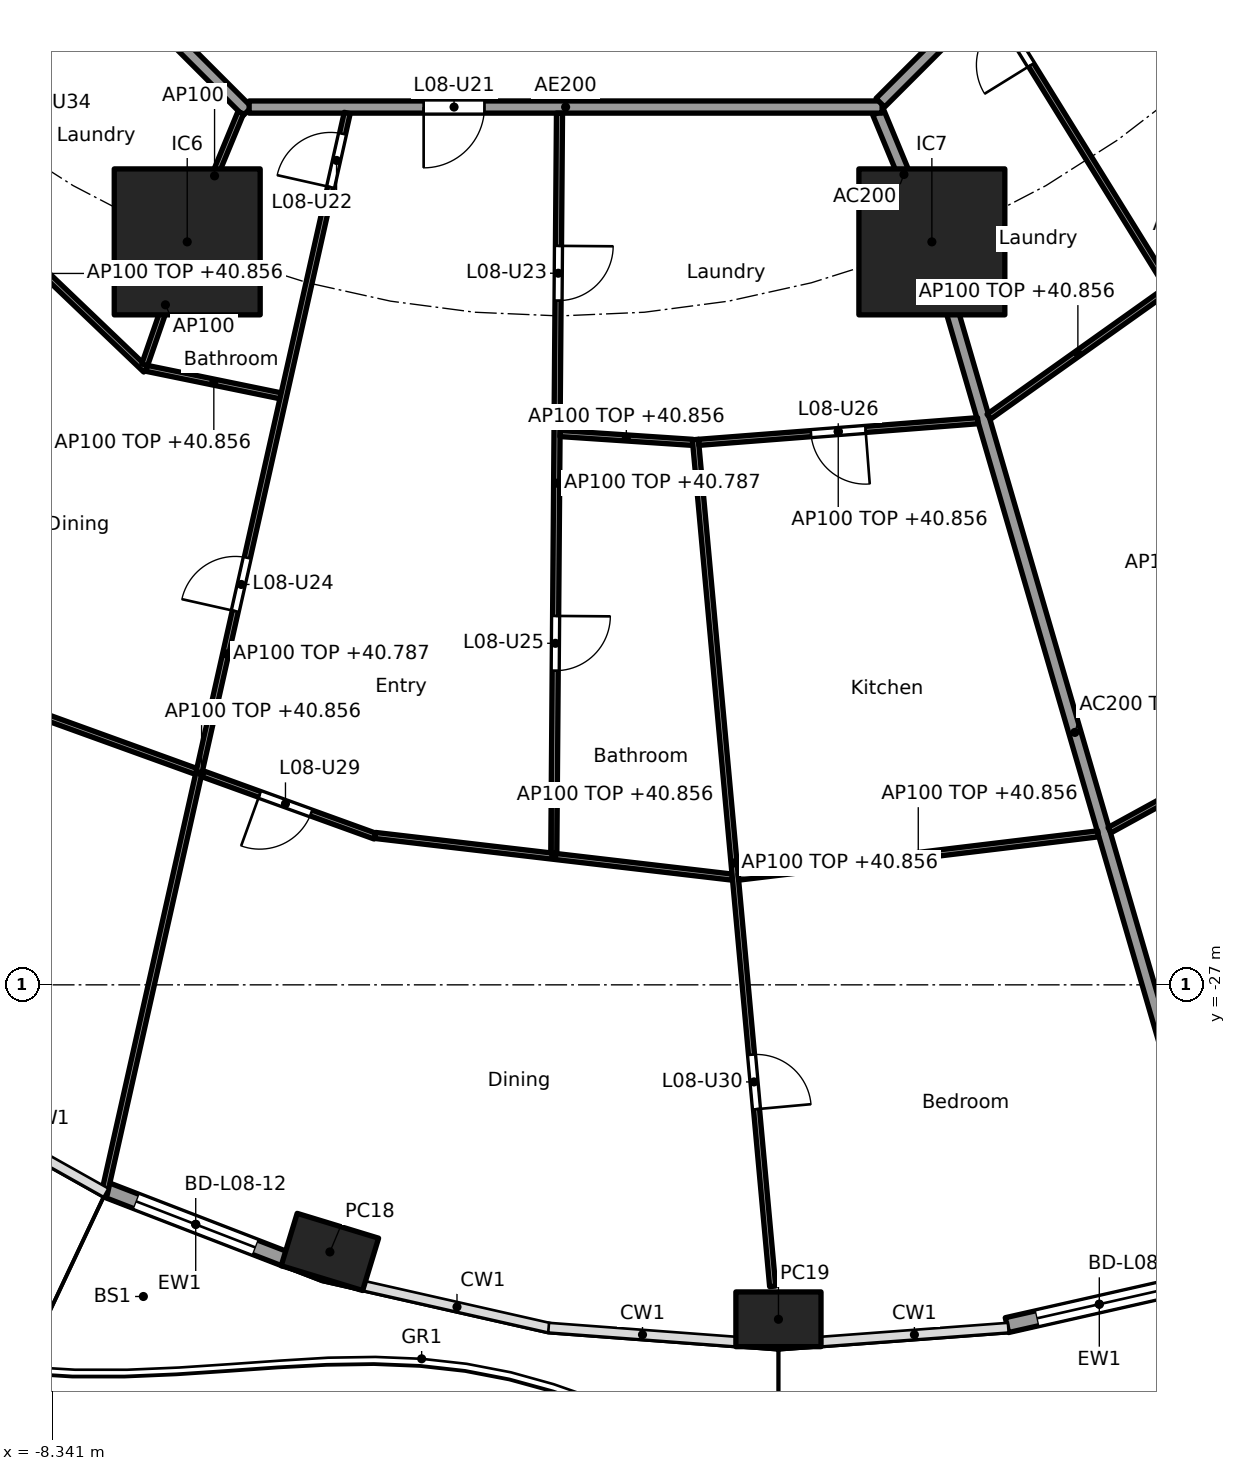
"""IFC4 building model, lengths in metres.
Left out: names, types, materials, properties, quantities, classifications, styles, units other than length and angle.
Written with IfcOpenShell. Run it as: python <this file> out.ifc"""

import sys

from ifc_helpers import new_model, si_unit, direction, frame, frame_2d, origin, origin_2d, place, context, subcontext, project, spatial, rectangle, hollow_rectangle, extrude, element, fill, save


model = new_model("IFC4")
c1 = context("Model", 3, precision=1e-05, world=origin(), true_north=direction((0.0, 1.0)))
c2 = subcontext(c1, "Body", "Model", "MODEL_VIEW")
j1 = project(units=[si_unit("LENGTHUNIT", "METRE"), si_unit("PLANEANGLEUNIT", "RADIAN")], contexts=[c1])
p1 = place(None, origin())
s1 = spatial("IfcSite", under=j1, at=p1, CompositionType="ELEMENT")
p2 = place(p1, origin())
s2 = spatial("IfcBuilding", under=s1, at=p2, CompositionType="ELEMENT")
p3 = place(p2, frame((0.0, 0.0, 38.1)))
s3 = spatial("IfcBuildingStorey", under=s2, at=p3, CompositionType="ELEMENT", Elevation=38.1)
for number, where, z_axis, x_axis in (
    (1, (-3.776, -31.393, 0.0), (0.0, 0.0, 1.0), (0.957, -0.292, 0.0)),
    (2, (3.6, -32.5, 0.0), (0.0, 0.0, 1.0), (1.0, 0.0, 0.0)),
):
    element("IfcColumn", number, at=place(p3, frame(where, z_axis=z_axis, x_axis=x_axis)), inside=s3, PredefinedType="COLUMN", context=c2, shape_type="SweptSolid", body=[
        extrude(hollow_rectangle(XDim=1.4, YDim=0.9, WallThickness=0.05, at=origin_2d()), origin(), (0.0, 0.0, 1.0), 3.7),
    ])
for number, where, z_axis, x_axis in (
    (3, (-6.123, -14.782, 0.0), (0.0, 0.0, 1.0), (1.0, 0.0, 0.0)),
    (4, (6.123, -14.782, 0.0), (0.0, 0.0, 1.0), (1.0, 0.0, 0.0)),
):
    element("IfcColumn", number, at=place(p3, frame(where, z_axis=z_axis, x_axis=x_axis)), inside=s3, PredefinedType="COLUMN", context=c2, shape_type="SweptSolid", body=[
        extrude(rectangle(XDim=2.4, YDim=2.4, at=origin_2d()), origin(), (0.0, 0.0, 1.0), 3.7),
    ])
p4 = place(p3, frame((-4.514, -31.507, 0.0), z_axis=(0.0, 0.0, 1.0), x_axis=(-0.932809381943, 0.360370166577, 0.0)))
e5 = element("IfcWall", 5, at=p4, inside=s3, PredefinedType="SOLIDWALL", context=c2, shape_type="SweptSolid", body=[
    extrude(rectangle(XDim=3.151, YDim=0.25, at=frame_2d((1.575, 0.0))), origin(), (0.0, 0.0, 1.0), 3.44),
])
p5 = place(p4, frame((0.525, 0.0, 0.0)))
e6 = element("IfcOpeningElement", 6, at=p5, cuts=e5, PredefinedType="OPENING", context=c2, shape_type="SweptSolid", body=[
    extrude(rectangle(XDim=2.1, YDim=2.4, at=frame_2d((1.05, 1.2))), frame((0.0, 0.135, 0.0), z_axis=(0.0, -1.0, 0.0), x_axis=(1.0, 0.0, 0.0)), (0.0, 0.0, 1.0), 0.27),
])
p6 = place(p3, frame((10.396, -31.908, 0.0), z_axis=(0.0, 0.0, 1.0), x_axis=(-0.97533495413, -0.220729987208, 0.0)))
e7 = element("IfcWall", 7, at=p6, inside=s3, PredefinedType="SOLIDWALL", context=c2, shape_type="SweptSolid", body=[
    extrude(rectangle(XDim=3.115, YDim=0.25, at=frame_2d((1.557, 0.0))), origin(), (0.0, 0.0, 1.0), 3.44),
])
p7 = place(p6, frame((0.507, 0.0, 0.0)))
e8 = element("IfcOpeningElement", 8, at=p7, cuts=e7, PredefinedType="OPENING", context=c2, shape_type="SweptSolid", body=[
    extrude(rectangle(XDim=2.1, YDim=2.4, at=frame_2d((1.05, 1.2))), frame((0.0, 0.135, 0.0), z_axis=(0.0, -1.0, 0.0), x_axis=(1.0, 0.0, 0.0)), (0.0, 0.0, 1.0), 0.27),
])
p8 = place(p3, frame((5.243, -12.657, 0.0), z_axis=(0.0, 0.0, 1.0), x_axis=(0.382707856524, -0.923869415315, 0.0)))
e9 = element("IfcWall", 9, at=p8, inside=s3, PredefinedType="PARTITIONING", context=c2, shape_type="SweptSolid", body=[
    extrude(rectangle(XDim=2.2, YDim=0.2, at=frame_2d((1.1, 0.0))), origin(), (0.0, 0.0, 1.0), 3.44),
])
p9 = place(p3, frame((6.137, -14.83, 0.0), z_axis=(0.0, 0.0, 1.0), x_axis=(0.27985745069, -0.960041565399, 0.0)))
e10 = element("IfcWall", 10, at=p9, inside=s3, PredefinedType="PARTITIONING", context=c2, shape_type="SweptSolid", body=[
    extrude(rectangle(XDim=16.705, YDim=0.2, at=frame_2d((8.353, 0.0))), origin(), (0.0, 0.0, 1.0), 2.756),
])
p10 = place(p3, frame((-12.635, -5.134, 0.0), z_axis=(0.0, 0.0, 1.0), x_axis=(0.707106781187, -0.707106781187, 0.0)))
e11 = element("IfcWall", 11, at=p10, inside=s3, PredefinedType="PARTITIONING", context=c2, shape_type="SweptSolid", body=[
    extrude(rectangle(XDim=10.609, YDim=0.2, at=frame_2d((5.305, 0.0))), origin(), (0.0, 0.0, 1.0), 3.44),
])
p11 = place(p3, frame((-5.104, -12.565, 0.0), z_axis=(0.0, 0.0, 1.0), x_axis=(1.0, 0.0, 0.0)))
e12 = element("IfcWall", 12, at=p11, inside=s3, PredefinedType="PARTITIONING", context=c2, shape_type="SweptSolid", body=[
    extrude(rectangle(XDim=10.409, YDim=0.2, at=frame_2d((5.205, 0.0))), origin(), (0.0, 0.0, 1.0), 3.44),
])
p12 = place(p11, frame((2.87, 0.0, 0.0)))
e13 = element("IfcOpeningElement", 13, at=p12, cuts=e12, PredefinedType="OPENING", context=c2, shape_type="SweptSolid", body=[
    extrude(rectangle(XDim=1.0, YDim=2.1, at=frame_2d((0.5, 1.05))), frame((0.0, 0.11, 0.0), z_axis=(0.0, -1.0, 0.0), x_axis=(1.0, 0.0, 0.0)), (0.0, 0.0, 1.0), 0.22),
])
p13 = place(p3, frame((5.275, -12.494, 0.0), z_axis=(0.0, 0.0, 1.0), x_axis=(0.707106781187, 0.707106781187, 0.0)))
e14 = element("IfcWall", 14, at=p13, inside=s3, PredefinedType="PARTITIONING", context=c2, shape_type="SweptSolid", body=[
    extrude(rectangle(XDim=10.409, YDim=0.2, at=frame_2d((5.205, 0.0))), origin(), (0.0, 0.0, 1.0), 3.44),
])
p14 = place(p13, frame((8.508, 0.0, 0.0)))
e15 = element("IfcOpeningElement", 15, at=p14, cuts=e14, PredefinedType="OPENING", context=c2, shape_type="SweptSolid", body=[
    extrude(rectangle(XDim=1.0, YDim=2.1, at=frame_2d((0.5, 1.05))), frame((0.0, 0.11, 0.0), z_axis=(0.0, -1.0, 0.0), x_axis=(1.0, 0.0, 0.0)), (0.0, 0.0, 1.0), 0.22),
])
p15 = place(p3, frame((-7.715, -10.193, 0.0), z_axis=(0.0, 0.0, 1.0), x_axis=(-0.573126502256, -0.819466907454, 0.0)))
e16 = element("IfcWall", 16, at=p15, inside=s3, PredefinedType="PARTITIONING", context=c2, shape_type="SweptSolid", body=[
    extrude(rectangle(XDim=9.954, YDim=0.1, at=frame_2d((4.977, 0.0))), origin(), (0.0, 0.0, 1.0), 2.687),
])
p16 = place(p15, frame((6.631, 0.0, 0.0)))
e17 = element("IfcOpeningElement", 17, at=p16, cuts=e16, PredefinedType="OPENING", context=c2, shape_type="SweptSolid", body=[
    extrude(rectangle(XDim=0.9, YDim=2.1, at=frame_2d((0.45, 1.05))), frame((0.0, 0.06, 0.0), z_axis=(0.0, -1.0, 0.0), x_axis=(1.0, 0.0, 0.0)), (0.0, 0.0, 1.0), 0.12),
])
p17 = place(p15, frame((1.678, 0.0, 0.0)))
e18 = element("IfcOpeningElement", 18, at=p17, cuts=e16, PredefinedType="OPENING", context=c2, shape_type="SweptSolid", body=[
    extrude(rectangle(XDim=0.9, YDim=2.1, at=frame_2d((0.45, 1.05))), frame((0.0, 0.06, 0.0), z_axis=(0.0, -1.0, 0.0), x_axis=(1.0, 0.0, 0.0)), (0.0, 0.0, 1.0), 0.12),
])
p18 = place(p3, frame((-10.119, -13.716, 0.0), z_axis=(0.0, 0.0, 1.0), x_axis=(0.722763212502, -0.69109575216, 0.0)))
e19 = element("IfcWall", 19, at=p18, inside=s3, PredefinedType="PARTITIONING", context=c2, shape_type="SweptSolid", body=[
    extrude(rectangle(XDim=4.587, YDim=0.1, at=frame_2d((2.293, 0.0))), origin(), (0.0, 0.0, 1.0), 2.756),
])
p19 = place(p18, frame((0.938, 0.0, 0.0)))
e20 = element("IfcOpeningElement", 20, at=p19, cuts=e19, PredefinedType="OPENING", context=c2, shape_type="SweptSolid", body=[
    extrude(rectangle(XDim=0.9, YDim=2.1, at=frame_2d((0.45, 1.05))), frame((0.0, 0.06, 0.0), z_axis=(0.0, -1.0, 0.0), x_axis=(1.0, 0.0, 0.0)), (0.0, 0.0, 1.0), 0.12),
])
p20 = place(p3, frame((-5.243, -12.657, 0.0), z_axis=(0.0, 0.0, 1.0), x_axis=(-0.382719158442, -0.923864733477, 0.0)))
e21 = element("IfcWall", 21, at=p20, inside=s3, PredefinedType="PARTITIONING", context=c2, shape_type="SweptSolid", body=[
    extrude(rectangle(XDim=2.25, YDim=0.1, at=frame_2d((1.125, 0.0))), origin(), (0.0, 0.0, 1.0), 3.44),
])
p21 = place(p3, frame((-6.139, -14.83, 0.0), z_axis=(0.0, 0.0, 1.0), x_axis=(-0.327246993321, -0.944938836837, 0.0)))
e22 = element("IfcWall", 22, at=p21, inside=s3, PredefinedType="PARTITIONING", context=c2, shape_type="SweptSolid", body=[
    extrude(rectangle(XDim=2.09, YDim=0.1, at=frame_2d((1.045, 0.0))), origin(), (0.0, 0.0, 1.0), 3.44),
])
p22 = place(p3, frame((-6.791, -16.862, 0.0), z_axis=(0.0, 0.0, 1.0), x_axis=(0.979581941859, -0.201045316246, 0.0)))
e23 = element("IfcWall", 23, at=p22, inside=s3, PredefinedType="PARTITIONING", context=c2, shape_type="SweptSolid", body=[
    extrude(rectangle(XDim=2.256, YDim=0.1, at=frame_2d((1.128, 0.0))), origin(), (0.0, 0.0, 1.0), 2.756),
])
p23 = place(p3, frame((-8.739, -22.491, 0.0), z_axis=(0.0, 0.0, 1.0), x_axis=(0.940401691072, -0.340065669288, 0.0)))
e24 = element("IfcWall", 24, at=p23, inside=s3, PredefinedType="PARTITIONING", context=c2, shape_type="SweptSolid", body=[
    extrude(rectangle(XDim=6.067, YDim=0.1, at=frame_2d((3.034, 0.0))), origin(), (0.0, 0.0, 1.0), 2.756),
])
p24 = place(p23, frame((4.05, 0.0, 0.0)))
e25 = element("IfcOpeningElement", 25, at=p24, cuts=e24, PredefinedType="OPENING", context=c2, shape_type="SweptSolid", body=[
    extrude(rectangle(XDim=0.9, YDim=2.1, at=frame_2d((0.45, 1.05))), frame((0.0, 0.06, 0.0), z_axis=(0.0, -1.0, 0.0), x_axis=(1.0, 0.0, 0.0)), (0.0, 0.0, 1.0), 0.12),
])
p25 = place(p3, frame((-3.492, -12.662, 0.0), z_axis=(0.0, 0.0, 1.0), x_axis=(-0.219268088006, -0.975664648115, 0.0)))
e26 = element("IfcWall", 26, at=p25, inside=s3, PredefinedType="PARTITIONING", context=c2, shape_type="SweptSolid", body=[
    extrude(rectangle(XDim=18.23, YDim=0.1, at=frame_2d((9.115, 0.0))), origin(), (0.0, 0.0, 1.0), 2.687),
])
p26 = place(p25, frame((0.35, 0.0, 0.0)))
e27 = element("IfcOpeningElement", 27, at=p26, cuts=e26, PredefinedType="OPENING", context=c2, shape_type="SweptSolid", body=[
    extrude(rectangle(XDim=0.9, YDim=2.1, at=frame_2d((0.45, 1.05))), frame((0.0, 0.06, 0.0), z_axis=(0.0, -1.0, 0.0), x_axis=(1.0, 0.0, 0.0)), (0.0, 0.0, 1.0), 0.12),
])
p27 = place(p25, frame((7.497, 0.0, 0.0)))
e28 = element("IfcOpeningElement", 28, at=p27, cuts=e26, PredefinedType="OPENING", context=c2, shape_type="SweptSolid", body=[
    extrude(rectangle(XDim=0.9, YDim=2.1, at=frame_2d((0.45, 1.05))), frame((0.0, 0.06, 0.0), z_axis=(0.0, -1.0, 0.0), x_axis=(1.0, 0.0, 0.0)), (0.0, 0.0, 1.0), 0.12),
])
p28 = place(p3, frame((-3.031, -24.543, 0.0), z_axis=(0.0, 0.0, 1.0), x_axis=(0.993255612046, -0.115945198862, 0.0)))
e29 = element("IfcWall", 29, at=p28, inside=s3, PredefinedType="PARTITIONING", context=c2, shape_type="SweptSolid", body=[
    extrude(rectangle(XDim=5.913, YDim=0.1, at=frame_2d((2.956, 0.0))), origin(), (0.0, 0.0, 1.0), 2.756),
])
p29 = place(p3, frame((-0.001, -12.665, 0.0), z_axis=(0.0, 0.0, 1.0), x_axis=(-0.007702417287, -0.999970335944, 0.0)))
e30 = element("IfcWall", 30, at=p29, inside=s3, PredefinedType="PARTITIONING", context=c2, shape_type="SweptSolid", body=[
    extrude(rectangle(XDim=12.171, YDim=0.1, at=frame_2d((6.086, 0.0))), origin(), (0.0, 0.0, 1.0), 2.687),
])
p30 = place(p29, frame((2.183, 0.0, 0.0)))
e31 = element("IfcOpeningElement", 31, at=p30, cuts=e30, PredefinedType="OPENING", context=c2, shape_type="SweptSolid", body=[
    extrude(rectangle(XDim=0.9, YDim=2.1, at=frame_2d((0.45, 1.05))), frame((0.0, 0.06, 0.0), z_axis=(0.0, -1.0, 0.0), x_axis=(1.0, 0.0, 0.0)), (0.0, 0.0, 1.0), 0.12),
])
p31 = place(p29, frame((8.269, 0.0, 0.0)))
e32 = element("IfcOpeningElement", 32, at=p31, cuts=e30, PredefinedType="OPENING", context=c2, shape_type="SweptSolid", body=[
    extrude(rectangle(XDim=0.9, YDim=2.1, at=frame_2d((0.45, 1.05))), frame((0.0, 0.06, 0.0), z_axis=(0.0, -1.0, 0.0), x_axis=(1.0, 0.0, 0.0)), (0.0, 0.0, 1.0), 0.12),
])
p32 = place(p3, frame((0.009, -17.934, 0.0), z_axis=(0.0, 0.0, 1.0), x_axis=(0.997794542617, -0.066378089183, 0.0)))
e33 = element("IfcWall", 33, at=p32, inside=s3, PredefinedType="PARTITIONING", context=c2, shape_type="SweptSolid", body=[
    extrude(rectangle(XDim=2.185, YDim=0.1, at=frame_2d((1.092, 0.0))), origin(), (0.0, 0.0, 1.0), 2.756),
])
p33 = place(p3, frame((2.234, -18.032, 0.0), z_axis=(0.0, 0.0, 1.0), x_axis=(0.090891502968, -0.995860800859, 0.0)))
e34 = element("IfcWall", 34, at=p33, inside=s3, PredefinedType="PARTITIONING", context=c2, shape_type="SweptSolid", body=[
    extrude(rectangle(XDim=13.984, YDim=0.1, at=frame_2d((6.992, 0.0))), origin(), (0.0, 0.0, 1.0), 2.756),
])
p34 = place(p33, frame((10.158, 0.0, 0.0)))
e35 = element("IfcOpeningElement", 35, at=p34, cuts=e34, PredefinedType="OPENING", context=c2, shape_type="SweptSolid", body=[
    extrude(rectangle(XDim=0.9, YDim=2.1, at=frame_2d((0.45, 1.05))), frame((0.0, 0.06, 0.0), z_axis=(0.0, -1.0, 0.0), x_axis=(1.0, 0.0, 0.0)), (0.0, 0.0, 1.0), 0.12),
])
p35 = place(p3, frame((2.288, -18.078, 0.0), z_axis=(0.0, 0.0, 1.0), x_axis=(0.99701850123, 0.077162868047, 0.0)))
e36 = element("IfcWall", 36, at=p35, inside=s3, PredefinedType="PARTITIONING", context=c2, shape_type="SweptSolid", body=[
    extrude(rectangle(XDim=4.604, YDim=0.1, at=frame_2d((2.302, 0.0))), origin(), (0.0, 0.0, 1.0), 2.756),
])
p36 = place(p35, frame((1.852, 0.0, 0.0)))
e37 = element("IfcOpeningElement", 37, at=p36, cuts=e36, PredefinedType="OPENING", context=c2, shape_type="SweptSolid", body=[
    extrude(rectangle(XDim=0.9, YDim=2.1, at=frame_2d((0.45, 1.05))), frame((0.0, 0.06, 0.0), z_axis=(0.0, -1.0, 0.0), x_axis=(1.0, 0.0, 0.0)), (0.0, 0.0, 1.0), 0.12),
])
p37 = place(p3, frame((2.941, -25.229, 0.0), z_axis=(0.0, 0.0, 1.0), x_axis=(0.992834127896, 0.119500604542, 0.0)))
e38 = element("IfcWall", 38, at=p37, inside=s3, PredefinedType="PARTITIONING", context=c2, shape_type="SweptSolid", body=[
    extrude(rectangle(XDim=5.959, YDim=0.1, at=frame_2d((2.98, 0.0))), origin(), (0.0, 0.0, 1.0), 2.756),
])
p38 = place(p3, frame((7.06, -17.657, 0.0), z_axis=(0.0, 0.0, 1.0), x_axis=(0.81492039338, 0.57957290521, 0.0)))
e39 = element("IfcWall", 39, at=p38, inside=s3, PredefinedType="PARTITIONING", context=c2, shape_type="SweptSolid", body=[
    extrude(rectangle(XDim=3.594, YDim=0.1, at=frame_2d((1.797, 0.0))), origin(), (0.0, 0.0, 1.0), 2.756),
])
p39 = place(p3, frame((9.045, -24.456, 0.0), z_axis=(0.0, 0.0, 1.0), x_axis=(0.876809987787, 0.480837025734, 0.0)))
e40 = element("IfcWall", 40, at=p39, inside=s3, PredefinedType="PARTITIONING", context=c2, shape_type="SweptSolid", body=[
    extrude(rectangle(XDim=5.486, YDim=0.1, at=frame_2d((2.743, 0.0))), origin(), (0.0, 0.0, 1.0), 2.756),
])
p40 = place(p3, frame((7.097, -10.81, 0.0), z_axis=(0.0, 0.0, 1.0), x_axis=(0.526453266471, -0.850204068576, 0.0)))
e41 = element("IfcWall", 41, at=p40, inside=s3, PredefinedType="PARTITIONING", context=c2, shape_type="SweptSolid", body=[
    extrude(rectangle(XDim=19.85, YDim=0.1, at=frame_2d((9.925, 0.0))), origin(), (0.0, 0.0, 1.0), 2.687),
])
p41 = place(p40, frame((0.35, 0.0, 0.0)))
e42 = element("IfcOpeningElement", 42, at=p41, cuts=e41, PredefinedType="OPENING", context=c2, shape_type="SweptSolid", body=[
    extrude(rectangle(XDim=0.9, YDim=2.1, at=frame_2d((0.45, 1.05))), frame((0.0, 0.06, 0.0), z_axis=(0.0, -1.0, 0.0), x_axis=(1.0, 0.0, 0.0)), (0.0, 0.0, 1.0), 0.12),
])
p42 = place(p40, frame((8.795, 0.0, 0.0)))
e43 = element("IfcOpeningElement", 43, at=p42, cuts=e41, PredefinedType="OPENING", context=c2, shape_type="SweptSolid", body=[
    extrude(rectangle(XDim=0.9, YDim=2.1, at=frame_2d((0.45, 1.05))), frame((0.0, 0.06, 0.0), z_axis=(0.0, -1.0, 0.0), x_axis=(1.0, 0.0, 0.0)), (0.0, 0.0, 1.0), 0.12),
])
p43 = place(p40, frame((15.935, 0.0, 0.0)))
e44 = element("IfcOpeningElement", 44, at=p43, cuts=e41, PredefinedType="OPENING", context=c2, shape_type="SweptSolid", body=[
    extrude(rectangle(XDim=0.9, YDim=2.1, at=frame_2d((0.45, 1.05))), frame((0.0, 0.06, 0.0), z_axis=(0.0, -1.0, 0.0), x_axis=(1.0, 0.0, 0.0)), (0.0, 0.0, 1.0), 0.12),
])
p44 = place(p5, origin())
e45 = element("IfcDoor", 45, at=p44, inside=s3, OperationType="SLIDING_TO_LEFT", PredefinedType="DOOR", context=c2, shape_type="SweptSolid", body=[
    extrude(rectangle(XDim=2.1, YDim=2.4, at=frame_2d((1.05, 1.2))), frame((0.0, 0.025, 0.0), z_axis=(0.0, -1.0, 0.0), x_axis=(1.0, 0.0, 0.0)), (0.0, 0.0, 1.0), 0.05),
])
fill(e6, e45)
p45 = place(p7, origin())
e46 = element("IfcDoor", 46, at=p45, inside=s3, OperationType="SLIDING_TO_LEFT", PredefinedType="DOOR", context=c2, shape_type="SweptSolid", body=[
    extrude(rectangle(XDim=2.1, YDim=2.4, at=frame_2d((1.05, 1.2))), frame((0.0, 0.025, 0.0), z_axis=(0.0, -1.0, 0.0), x_axis=(1.0, 0.0, 0.0)), (0.0, 0.0, 1.0), 0.05),
])
fill(e8, e46)
p46 = place(p12, frame((1.0, 0.0, 0.0), x_axis=(-1.0, 0.0, 0.0)))
e47 = element("IfcDoor", 47, at=p46, inside=s3, OperationType="SINGLE_SWING_RIGHT", PredefinedType="DOOR", context=c2, shape_type="SweptSolid", body=[
    extrude(rectangle(XDim=1.0, YDim=2.1, at=frame_2d((0.5, 1.05))), frame((0.0, 0.025, 0.0), z_axis=(0.0, -1.0, 0.0), x_axis=(1.0, 0.0, 0.0)), (0.0, 0.0, 1.0), 0.05),
])
fill(e13, e47)
p47 = place(p26, frame((0.9, 0.0, 0.0), x_axis=(-1.0, 0.0, 0.0)))
e48 = element("IfcDoor", 48, at=p47, inside=s3, OperationType="SINGLE_SWING_LEFT", PredefinedType="DOOR", context=c2, shape_type="SweptSolid", body=[
    extrude(rectangle(XDim=0.9, YDim=2.1, at=frame_2d((0.45, 1.05))), frame((0.0, 0.025, 0.0), z_axis=(0.0, -1.0, 0.0), x_axis=(1.0, 0.0, 0.0)), (0.0, 0.0, 1.0), 0.05),
])
fill(e27, e48)
p48 = place(p30, origin())
e49 = element("IfcDoor", 49, at=p48, inside=s3, OperationType="SINGLE_SWING_LEFT", PredefinedType="DOOR", context=c2, shape_type="SweptSolid", body=[
    extrude(rectangle(XDim=0.9, YDim=2.1, at=frame_2d((0.45, 1.05))), frame((0.0, 0.025, 0.0), z_axis=(0.0, -1.0, 0.0), x_axis=(1.0, 0.0, 0.0)), (0.0, 0.0, 1.0), 0.05),
])
fill(e31, e49)
p49 = place(p27, frame((0.9, 0.0, 0.0), x_axis=(-1.0, 0.0, 0.0)))
e50 = element("IfcDoor", 50, at=p49, inside=s3, OperationType="SINGLE_SWING_LEFT", PredefinedType="DOOR", context=c2, shape_type="SweptSolid", body=[
    extrude(rectangle(XDim=0.9, YDim=2.1, at=frame_2d((0.45, 1.05))), frame((0.0, 0.025, 0.0), z_axis=(0.0, -1.0, 0.0), x_axis=(1.0, 0.0, 0.0)), (0.0, 0.0, 1.0), 0.05),
])
fill(e28, e50)
p50 = place(p31, origin())
e51 = element("IfcDoor", 51, at=p50, inside=s3, OperationType="SINGLE_SWING_LEFT", PredefinedType="DOOR", context=c2, shape_type="SweptSolid", body=[
    extrude(rectangle(XDim=0.9, YDim=2.1, at=frame_2d((0.45, 1.05))), frame((0.0, 0.025, 0.0), z_axis=(0.0, -1.0, 0.0), x_axis=(1.0, 0.0, 0.0)), (0.0, 0.0, 1.0), 0.05),
])
fill(e32, e51)
p51 = place(p36, frame((0.9, 0.0, 0.0), x_axis=(-1.0, 0.0, 0.0)))
e52 = element("IfcDoor", 52, at=p51, inside=s3, OperationType="SINGLE_SWING_LEFT", PredefinedType="DOOR", context=c2, shape_type="SweptSolid", body=[
    extrude(rectangle(XDim=0.9, YDim=2.1, at=frame_2d((0.45, 1.05))), frame((0.0, 0.025, 0.0), z_axis=(0.0, -1.0, 0.0), x_axis=(1.0, 0.0, 0.0)), (0.0, 0.0, 1.0), 0.05),
])
fill(e37, e52)
p52 = place(p24, frame((0.9, 0.0, 0.0), x_axis=(-1.0, 0.0, 0.0)))
e53 = element("IfcDoor", 53, at=p52, inside=s3, OperationType="SINGLE_SWING_RIGHT", PredefinedType="DOOR", context=c2, shape_type="SweptSolid", body=[
    extrude(rectangle(XDim=0.9, YDim=2.1, at=frame_2d((0.45, 1.05))), frame((0.0, 0.025, 0.0), z_axis=(0.0, -1.0, 0.0), x_axis=(1.0, 0.0, 0.0)), (0.0, 0.0, 1.0), 0.05),
])
fill(e25, e53)
p53 = place(p34, origin())
e54 = element("IfcDoor", 54, at=p53, inside=s3, OperationType="SINGLE_SWING_RIGHT", PredefinedType="DOOR", context=c2, shape_type="SweptSolid", body=[
    extrude(rectangle(XDim=0.9, YDim=2.1, at=frame_2d((0.45, 1.05))), frame((0.0, 0.025, 0.0), z_axis=(0.0, -1.0, 0.0), x_axis=(1.0, 0.0, 0.0)), (0.0, 0.0, 1.0), 0.05),
])
fill(e35, e54)
p54 = place(p41, frame((0.9, 0.0, 0.0), x_axis=(-1.0, 0.0, 0.0)))
e55 = element("IfcDoor", 55, at=p54, inside=s3, OperationType="SINGLE_SWING_LEFT", PredefinedType="DOOR", context=c2, shape_type="SweptSolid", body=[
    extrude(rectangle(XDim=0.9, YDim=2.1, at=frame_2d((0.45, 1.05))), frame((0.0, 0.025, 0.0), z_axis=(0.0, -1.0, 0.0), x_axis=(1.0, 0.0, 0.0)), (0.0, 0.0, 1.0), 0.05),
])
fill(e42, e55)
save(model, sys.argv[1])
